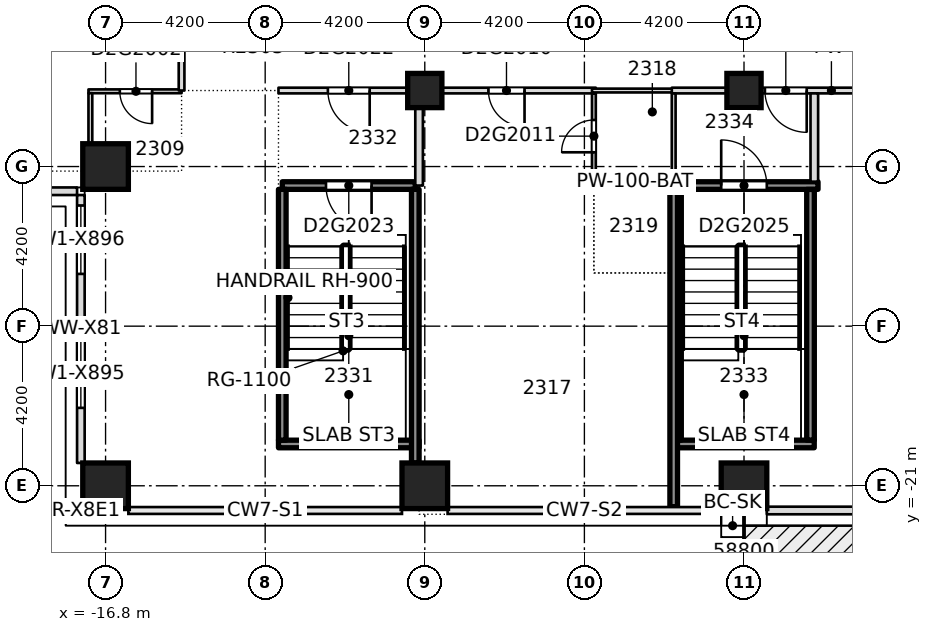
"""IFC4 building model, lengths in metres.
Left out: names, types, materials, properties, quantities, classifications, styles, units other than length and angle.
Written with IfcOpenShell. Run it as: python <this file> out.ifc"""

import sys

from ifc_helpers import new_model, si_unit, direction, frame, frame_2d, origin, origin_2d, place, context, subcontext, project, spatial, rectangle, extrude, element, fill, save


model = new_model("IFC4")
c1 = context("Model", 3, precision=1e-05, world=origin(), true_north=direction((0.0, 1.0)))
c2 = subcontext(c1, "Body", "Model", "MODEL_VIEW")
j1 = project(units=[si_unit("LENGTHUNIT", "METRE"), si_unit("PLANEANGLEUNIT", "RADIAN")], contexts=[c1])
p1 = place(None, origin())
s1 = spatial("IfcSite", under=j1, at=p1, CompositionType="ELEMENT")
p2 = place(p1, origin())
s2 = spatial("IfcBuilding", under=s1, at=p2, CompositionType="ELEMENT")
p3 = place(p2, frame((0.0, 0.0, 94.2)))
s3 = spatial("IfcBuildingStorey", under=s2, at=p3, CompositionType="ELEMENT", Elevation=94.2)
for number, where, z_axis, x_axis in (
    (1, (-16.8, -21.0, -0.32), (0.0, 0.0, 1.0), (1.0, 0.0, 0.0)),
    (2, (-8.4, -21.0, -0.32), (0.0, 0.0, 1.0), (1.0, 0.0, 0.0)),
    (3, (0.0, -21.0, -0.32), (0.0, 0.0, 1.0), (1.0, 0.0, 0.0)),
    (4, (-16.8, -12.6, -0.32), (0.0, 0.0, 1.0), (1.0, 0.0, 0.0)),
):
    element("IfcColumn", number, at=place(p3, frame(where, z_axis=z_axis, x_axis=x_axis)), inside=s3, PredefinedType="COLUMN", context=c2, shape_type="SweptSolid", body=[
        extrude(rectangle(XDim=1.2, YDim=1.2, at=origin_2d()), origin(), (0.0, 0.0, 1.0), 3.45),
    ])
for number, where, z_axis, x_axis in (
    (5, (-8.4, -10.6, -0.32), (0.0, 0.0, 1.0), (1.0, 0.0, 0.0)),
    (6, (0.0, -10.6, -0.32), (0.0, 0.0, 1.0), (1.0, 0.0, 0.0)),
):
    element("IfcColumn", number, at=place(p3, frame(where, z_axis=z_axis, x_axis=x_axis)), inside=s3, PredefinedType="COLUMN", context=c2, shape_type="SweptSolid", body=[
        extrude(rectangle(XDim=0.9, YDim=0.9, at=origin_2d()), origin(), (0.0, 0.0, 1.0), 3.45),
    ])
p4 = place(p3, frame((-1.848, -19.9, 0.0), z_axis=(0.0, 0.0, 1.0), x_axis=(1.0, 0.0, 0.0)))
e7 = element("IfcWall", 7, at=p4, inside=s3, PredefinedType="SOLIDWALL", context=c2, shape_type="SweptSolid", body=[
    extrude(rectangle(XDim=3.696, YDim=0.2, at=frame_2d((1.848, 0.0))), origin(), (0.0, 0.0, 1.0), 3.13),
])
p5 = place(p3, frame((-12.15, -13.1, 0.0), z_axis=(0.0, 0.0, 1.0), x_axis=(1.0, 0.0, 0.0)))
e8 = element("IfcWall", 8, at=p5, inside=s3, PredefinedType="SOLIDWALL", context=c2, shape_type="SweptSolid", body=[
    extrude(rectangle(XDim=3.5, YDim=0.2, at=frame_2d((1.75, 0.0))), origin(), (0.0, 0.0, 1.0), 3.13),
])
p6 = place(p5, frame((1.15, 0.0, 0.0)))
e9 = element("IfcOpeningElement", 9, at=p6, cuts=e8, PredefinedType="OPENING", context=c2, shape_type="SweptSolid", body=[
    extrude(rectangle(XDim=1.2, YDim=2.1, at=frame_2d((0.6, 1.05))), frame((0.0, 0.11, 0.0), z_axis=(0.0, -1.0, 0.0), x_axis=(1.0, 0.0, 0.0)), (0.0, 0.0, 1.0), 0.22),
])
p7 = place(p3, frame((-1.748, -13.1, 0.0), z_axis=(0.0, 0.0, 1.0), x_axis=(1.0, 0.0, 0.0)))
e10 = element("IfcWall", 10, at=p7, inside=s3, PredefinedType="SOLIDWALL", context=c2, shape_type="SweptSolid", body=[
    extrude(rectangle(XDim=3.696, YDim=0.2, at=frame_2d((1.848, 0.0))), origin(), (0.0, 0.0, 1.0), 3.13),
])
p8 = place(p7, frame((1.148, 0.0, 0.0)))
e11 = element("IfcOpeningElement", 11, at=p8, cuts=e10, PredefinedType="OPENING", context=c2, shape_type="SweptSolid", body=[
    extrude(rectangle(XDim=1.2, YDim=2.1, at=frame_2d((0.6, 1.05))), frame((0.0, 0.11, 0.0), z_axis=(0.0, -1.0, 0.0), x_axis=(1.0, 0.0, 0.0)), (0.0, 0.0, 1.0), 0.22),
])
p9 = place(p3, frame((-4.0, -13.0, 0.0), z_axis=(0.0, 0.0, 1.0), x_axis=(1.0, 0.0, 0.0)))
e12 = element("IfcWall", 12, at=p9, inside=s3, PredefinedType="PARTITIONING", context=c2, shape_type="SweptSolid", body=[
    extrude(rectangle(XDim=2.25, YDim=0.1, at=frame_2d((1.125, 0.0))), origin(), (0.0, 0.0, 1.0), 3.13),
])
p10 = place(p3, frame((-17.25, -10.62, 0.0), z_axis=(0.0, 0.0, 1.0), x_axis=(1.0, 0.0, 0.0)))
e13 = element("IfcWall", 13, at=p10, inside=s3, PredefinedType="PARTITIONING", context=c2, shape_type="SweptSolid", body=[
    extrude(rectangle(XDim=2.45, YDim=0.1, at=frame_2d((1.225, 0.0))), origin(), (0.0, 0.0, 1.0), 3.13),
])
p11 = place(p10, frame((0.825, 0.0, 0.0)))
e14 = element("IfcOpeningElement", 14, at=p11, cuts=e13, PredefinedType="OPENING", context=c2, shape_type="SweptSolid", body=[
    extrude(rectangle(XDim=0.85, YDim=2.1, at=frame_2d((0.425, 1.05))), frame((0.0, 0.06, 0.0), z_axis=(0.0, -1.0, 0.0), x_axis=(1.0, 0.0, 0.0)), (0.0, 0.0, 1.0), 0.12),
])
p12 = place(p3, frame((-12.25, -10.6, 0.0), z_axis=(0.0, 0.0, 1.0), x_axis=(1.0, 0.0, 0.0)))
e15 = element("IfcWall", 15, at=p12, inside=s3, PredefinedType="PARTITIONING", context=c2, shape_type="SweptSolid", body=[
    extrude(rectangle(XDim=8.35, YDim=0.15, at=frame_2d((4.175, 0.0))), origin(), (0.0, 0.0, 1.0), 3.13),
])
p13 = place(p12, frame((5.525, 0.0, 0.0)))
e16 = element("IfcOpeningElement", 16, at=p13, cuts=e15, PredefinedType="OPENING", context=c2, shape_type="SweptSolid", body=[
    extrude(rectangle(XDim=0.95, YDim=2.1, at=frame_2d((0.475, 1.05))), frame((0.0, 0.085, 0.0), z_axis=(0.0, -1.0, 0.0), x_axis=(1.0, 0.0, 0.0)), (0.0, 0.0, 1.0), 0.17),
])
p14 = place(p12, frame((1.3, 0.0, 0.0)))
e17 = element("IfcOpeningElement", 17, at=p14, cuts=e15, PredefinedType="OPENING", context=c2, shape_type="SweptSolid", body=[
    extrude(rectangle(XDim=1.1, YDim=2.1, at=frame_2d((0.55, 1.05))), frame((0.0, 0.085, 0.0), z_axis=(0.0, -1.0, 0.0), x_axis=(1.0, 0.0, 0.0)), (0.0, 0.0, 1.0), 0.17),
])
p15 = place(p3, frame((-4.0, -10.6, 0.0), z_axis=(0.0, 0.0, 1.0), x_axis=(1.0, 0.0, 0.0)))
e18 = element("IfcWall", 18, at=p15, inside=s3, PredefinedType="PARTITIONING", context=c2, shape_type="SweptSolid", body=[
    extrude(rectangle(XDim=2.2, YDim=0.1, at=frame_2d((1.1, 0.0))), origin(), (0.0, 0.0, 1.0), 3.13),
])
p16 = place(p3, frame((-1.9, -10.6, 0.0), z_axis=(0.0, 0.0, 1.0), x_axis=(1.0, 0.0, 0.0)))
e19 = element("IfcWall", 19, at=p16, inside=s3, PredefinedType="PARTITIONING", context=c2, shape_type="SweptSolid", body=[
    extrude(rectangle(XDim=8.4, YDim=0.15, at=frame_2d((4.2, 0.0))), origin(), (0.0, 0.0, 1.0), 3.13),
])
p17 = place(p16, frame((5.575, 0.0, 0.0)))
e20 = element("IfcOpeningElement", 20, at=p17, cuts=e19, PredefinedType="OPENING", context=c2, shape_type="SweptSolid", body=[
    extrude(rectangle(XDim=0.95, YDim=2.1, at=frame_2d((0.475, 1.05))), frame((0.0, 0.085, 0.0), z_axis=(0.0, -1.0, 0.0), x_axis=(1.0, 0.0, 0.0)), (0.0, 0.0, 1.0), 0.17),
])
p18 = place(p16, frame((2.45, 0.0, 0.0)))
e21 = element("IfcOpeningElement", 21, at=p18, cuts=e19, PredefinedType="OPENING", context=c2, shape_type="SweptSolid", body=[
    extrude(rectangle(XDim=1.1, YDim=2.1, at=frame_2d((0.55, 1.05))), frame((0.0, 0.085, 0.0), z_axis=(0.0, -1.0, 0.0), x_axis=(1.0, 0.0, 0.0)), (0.0, 0.0, 1.0), 0.17),
])
p19 = place(p3, frame((-17.2, -12.72, 0.0), z_axis=(0.0, 0.0, 1.0), x_axis=(0.0, 1.0, 0.0)))
e22 = element("IfcWall", 22, at=p19, inside=s3, PredefinedType="PARTITIONING", context=c2, shape_type="SweptSolid", body=[
    extrude(rectangle(XDim=2.05, YDim=0.1, at=frame_2d((1.025, 0.0))), origin(), (0.0, 0.0, 1.0), 3.13),
])
p20 = place(p3, frame((-14.8, -10.6, 0.0), z_axis=(0.0, 0.0, 1.0), x_axis=(0.0, 1.0, 0.0)))
e23 = element("IfcWall", 23, at=p20, inside=s3, PredefinedType="PARTITIONING", context=c2, shape_type="SweptSolid", body=[
    extrude(rectangle(XDim=3.125, YDim=0.15, at=frame_2d((1.562, 0.0))), origin(), (0.0, 0.0, 1.0), 3.13),
])
p21 = place(p3, frame((-8.55, -13.1, 0.0), z_axis=(0.0, 0.0, 1.0), x_axis=(0.0, 1.0, 0.0)))
e24 = element("IfcWall", 24, at=p21, inside=s3, PredefinedType="PARTITIONING", context=c2, shape_type="SweptSolid", body=[
    extrude(rectangle(XDim=2.425, YDim=0.2, at=frame_2d((1.212, 0.0))), origin(), (0.0, 0.0, 1.0), 3.13),
])
p22 = place(p3, frame((-3.95, -12.95, 0.0), z_axis=(0.0, 0.0, 1.0), x_axis=(0.0, 1.0, 0.0)))
e25 = element("IfcWall", 25, at=p22, inside=s3, PredefinedType="PARTITIONING", context=c2, shape_type="SweptSolid", body=[
    extrude(rectangle(XDim=2.275, YDim=0.1, at=frame_2d((1.137, 0.0))), origin(), (0.0, 0.0, 1.0), 3.13),
])
p23 = place(p22, frame((0.725, 0.0, 0.0)))
e26 = element("IfcOpeningElement", 26, at=p23, cuts=e25, PredefinedType="OPENING", context=c2, shape_type="SweptSolid", body=[
    extrude(rectangle(XDim=0.85, YDim=2.1, at=frame_2d((0.425, 1.05))), frame((0.0, 0.06, 0.0), z_axis=(0.0, -1.0, 0.0), x_axis=(1.0, 0.0, 0.0)), (0.0, 0.0, 1.0), 0.12),
])
p24 = place(p3, frame((-1.85, -12.95, 0.0), z_axis=(0.0, 0.0, 1.0), x_axis=(0.0, 1.0, 0.0)))
e27 = element("IfcWall", 27, at=p24, inside=s3, PredefinedType="PARTITIONING", context=c2, shape_type="SweptSolid", body=[
    extrude(rectangle(XDim=2.275, YDim=0.1, at=frame_2d((1.137, 0.0))), origin(), (0.0, 0.0, 1.0), 3.13),
])
for number, where, z_axis, x_axis in (
    (28, (-1.75, -19.798, 0.0), (0.0, 0.0, 1.0), (0.0, 1.0, 0.0)),
    (29, (1.75, -19.798, 0.0), (0.0, 0.0, 1.0), (0.0, 1.0, 0.0)),
):
    element("IfcWall", number, at=place(p3, frame(where, z_axis=z_axis, x_axis=x_axis)), inside=s3, PredefinedType="SOLIDWALL", context=c2, shape_type="SweptSolid", body=[
        extrude(rectangle(XDim=6.596, YDim=0.2, at=frame_2d((3.298, 0.0))), origin(), (0.0, 0.0, 1.0), 3.13),
    ])
p25 = place(p3, frame((1.85, -12.998, 0.0), z_axis=(0.0, 0.0, 1.0), x_axis=(0.0, 1.0, 0.0)))
e30 = element("IfcWall", 30, at=p25, inside=s3, PredefinedType="PARTITIONING", context=c2, shape_type="SweptSolid", body=[
    extrude(rectangle(XDim=2.323, YDim=0.2, at=frame_2d((1.162, 0.0))), origin(), (0.0, 0.0, 1.0), 3.13),
])
p26 = place(p3, frame((0.6, -21.65, 0.0), z_axis=(0.0, 0.0, 1.0), x_axis=(1.0, 0.0, 0.0)))
e31 = element("IfcWall", 31, at=p26, inside=s3, PredefinedType="STANDARD", context=c2, shape_type="SweptSolid", body=[
    extrude(rectangle(XDim=7.2, YDim=0.2, at=frame_2d((3.6, 0.0))), origin(), (0.0, 0.0, 1.0), 3.13),
])
p27 = place(p26, frame((3.95, 0.0, 0.2)))
e32 = element("IfcOpeningElement", 32, at=p27, cuts=e31, PredefinedType="OPENING", context=c2, shape_type="SweptSolid", body=[
    extrude(rectangle(XDim=1.8, YDim=2.65, at=frame_2d((0.9, 1.325))), frame((0.0, 0.11, 0.0), z_axis=(0.0, -1.0, 0.0), x_axis=(1.0, 0.0, 0.0)), (0.0, 0.0, 1.0), 0.22),
])
p28 = place(p26, frame((5.85, 0.0, 0.0)))
e33 = element("IfcOpeningElement", 33, at=p28, cuts=e31, PredefinedType="OPENING", context=c2, shape_type="SweptSolid", body=[
    extrude(rectangle(XDim=1.0, YDim=2.4, at=frame_2d((0.5, 1.2))), frame((0.0, 0.11, 0.0), z_axis=(0.0, -1.0, 0.0), x_axis=(1.0, 0.0, 0.0)), (0.0, 0.0, 1.0), 0.22),
])
p29 = place(p3, frame((-24.6, -13.25, 0.0), z_axis=(0.0, 0.0, 1.0), x_axis=(1.0, 0.0, 0.0)))
e34 = element("IfcWall", 34, at=p29, inside=s3, PredefinedType="STANDARD", context=c2, shape_type="SweptSolid", body=[
    extrude(rectangle(XDim=7.05, YDim=0.2, at=frame_2d((3.525, 0.0))), origin(), (0.0, 0.0, 1.0), 3.13),
])
p30 = place(p3, frame((-17.45, -13.35, 0.0), z_axis=(0.0, 0.0, 1.0), x_axis=(0.0, -1.0, 0.0)))
e35 = element("IfcWall", 35, at=p30, inside=s3, PredefinedType="STANDARD", context=c2, shape_type="SweptSolid", body=[
    extrude(rectangle(XDim=7.05, YDim=0.2, at=frame_2d((3.525, 0.0))), origin(), (0.0, 0.0, 1.0), 3.13),
])
p31 = place(p30, frame((3.8, 0.0, 0.2)))
e36 = element("IfcOpeningElement", 36, at=p31, cuts=e35, PredefinedType="OPENING", context=c2, shape_type="SweptSolid", body=[
    extrude(rectangle(XDim=1.8, YDim=2.65, at=frame_2d((0.9, 1.325))), frame((0.0, 0.11, 0.0), z_axis=(0.0, -1.0, 0.0), x_axis=(1.0, 0.0, 0.0)), (0.0, 0.0, 1.0), 0.22),
])
p32 = place(p30, frame((0.275, 0.0, 0.2)))
e37 = element("IfcOpeningElement", 37, at=p32, cuts=e35, PredefinedType="OPENING", context=c2, shape_type="SweptSolid", body=[
    extrude(rectangle(XDim=1.8, YDim=2.65, at=frame_2d((0.9, 1.325))), frame((0.0, 0.11, 0.0), z_axis=(0.0, -1.0, 0.0), x_axis=(1.0, 0.0, 0.0)), (0.0, 0.0, 1.0), 0.22),
])
p33 = place(p3, frame((-12.25, -19.9, 0.0), z_axis=(0.0, 0.0, 1.0), x_axis=(1.0, 0.0, 0.0)))
e38 = element("IfcWall", 38, at=p33, inside=s3, PredefinedType="SOLIDWALL", context=c2, shape_type="SweptSolid", body=[
    extrude(rectangle(XDim=3.7, YDim=0.2, at=frame_2d((1.85, 0.0))), origin(), (0.0, 0.0, 1.0), 3.13),
])
p34 = place(p3, frame((-12.15, -19.8, 0.0), z_axis=(0.0, 0.0, 1.0), x_axis=(0.0, 1.0, 0.0)))
e39 = element("IfcWall", 39, at=p34, inside=s3, PredefinedType="SOLIDWALL", context=c2, shape_type="SweptSolid", body=[
    extrude(rectangle(XDim=6.6, YDim=0.2, at=frame_2d((3.3, 0.0))), origin(), (0.0, 0.0, 1.0), 3.13),
])
p35 = place(p3, frame((-8.65, -20.4, 0.0), z_axis=(0.0, 0.0, 1.0), x_axis=(0.0, 1.0, 0.0)))
e40 = element("IfcWall", 40, at=p35, inside=s3, PredefinedType="SOLIDWALL", context=c2, shape_type="SweptSolid", body=[
    extrude(rectangle(XDim=7.2, YDim=0.2, at=frame_2d((3.6, 0.0))), origin(), (0.0, 0.0, 1.0), 3.13),
])
p36 = place(p3, frame((-1.85, -21.55, 0.0), z_axis=(0.0, 0.0, 1.0), x_axis=(0.0, 1.0, 0.0)))
e41 = element("IfcWall", 41, at=p36, inside=s3, PredefinedType="SOLIDWALL", context=c2, shape_type="SweptSolid", body=[
    extrude(rectangle(XDim=8.5, YDim=0.2, at=frame_2d((4.25, 0.0))), origin(), (0.0, 0.0, 1.0), 3.13),
])
p37 = place(p11, origin())
e42 = element("IfcDoor", 42, at=p37, inside=s3, OperationType="SINGLE_SWING_RIGHT", PredefinedType="DOOR", context=c2, shape_type="SweptSolid", body=[
    extrude(rectangle(XDim=0.85, YDim=2.1, at=frame_2d((0.425, 1.05))), frame((0.0, 0.025, 0.0), z_axis=(0.0, -1.0, 0.0), x_axis=(1.0, 0.0, 0.0)), (0.0, 0.0, 1.0), 0.05),
])
fill(e14, e42)
p38 = place(p13, origin())
e43 = element("IfcDoor", 43, at=p38, inside=s3, OperationType="SINGLE_SWING_LEFT", PredefinedType="DOOR", context=c2, shape_type="SweptSolid", body=[
    extrude(rectangle(XDim=0.95, YDim=2.1, at=frame_2d((0.475, 1.05))), frame((0.0, 0.025, 0.0), z_axis=(0.0, -1.0, 0.0), x_axis=(1.0, 0.0, 0.0)), (0.0, 0.0, 1.0), 0.05),
])
fill(e16, e43)
p39 = place(p23, origin())
e44 = element("IfcDoor", 44, at=p39, inside=s3, OperationType="SINGLE_SWING_RIGHT", PredefinedType="DOOR", context=c2, shape_type="SweptSolid", body=[
    extrude(rectangle(XDim=0.85, YDim=2.1, at=frame_2d((0.425, 1.05))), frame((0.0, 0.025, 0.0), z_axis=(0.0, -1.0, 0.0), x_axis=(1.0, 0.0, 0.0)), (0.0, 0.0, 1.0), 0.05),
])
fill(e26, e44)
p40 = place(p14, origin())
e45 = element("IfcDoor", 45, at=p40, inside=s3, OperationType="SINGLE_SWING_RIGHT", PredefinedType="DOOR", context=c2, shape_type="SweptSolid", body=[
    extrude(rectangle(XDim=1.1, YDim=2.1, at=frame_2d((0.55, 1.05))), frame((0.0, 0.025, 0.0), z_axis=(0.0, -1.0, 0.0), x_axis=(1.0, 0.0, 0.0)), (0.0, 0.0, 1.0), 0.05),
])
fill(e17, e45)
p41 = place(p6, origin())
e46 = element("IfcDoor", 46, at=p41, inside=s3, OperationType="SINGLE_SWING_RIGHT", PredefinedType="DOOR", context=c2, shape_type="SweptSolid", body=[
    extrude(rectangle(XDim=1.2, YDim=2.1, at=frame_2d((0.6, 1.05))), frame((0.0, 0.025, 0.0), z_axis=(0.0, -1.0, 0.0), x_axis=(1.0, 0.0, 0.0)), (0.0, 0.0, 1.0), 0.05),
])
fill(e9, e46)
p42 = place(p18, origin())
e47 = element("IfcDoor", 47, at=p42, inside=s3, OperationType="SINGLE_SWING_LEFT", PredefinedType="DOOR", context=c2, shape_type="SweptSolid", body=[
    extrude(rectangle(XDim=1.1, YDim=2.1, at=frame_2d((0.55, 1.05))), frame((0.0, 0.025, 0.0), z_axis=(0.0, -1.0, 0.0), x_axis=(1.0, 0.0, 0.0)), (0.0, 0.0, 1.0), 0.05),
])
fill(e21, e47)
p43 = place(p8, origin())
e48 = element("IfcDoor", 48, at=p43, inside=s3, OperationType="SINGLE_SWING_RIGHT", PredefinedType="DOOR", context=c2, shape_type="SweptSolid", body=[
    extrude(rectangle(XDim=1.2, YDim=2.1, at=frame_2d((0.6, 1.05))), frame((0.0, 0.025, 0.0), z_axis=(0.0, -1.0, 0.0), x_axis=(1.0, 0.0, 0.0)), (0.0, 0.0, 1.0), 0.05),
])
fill(e11, e48)
p44 = place(p31, origin())
e49 = element("IfcWindow", 49, at=p44, inside=s3, PartitioningType="SINGLE_PANEL", PredefinedType="WINDOW", context=c2, shape_type="SweptSolid", body=[
    extrude(rectangle(XDim=1.8, YDim=2.65, at=frame_2d((0.9, 1.325))), frame((0.0, 0.03, 0.0), z_axis=(0.0, -1.0, 0.0), x_axis=(1.0, 0.0, 0.0)), (0.0, 0.0, 1.0), 0.06),
])
fill(e36, e49)
p45 = place(p32, origin())
e50 = element("IfcWindow", 50, at=p45, inside=s3, PartitioningType="SINGLE_PANEL", PredefinedType="WINDOW", context=c2, shape_type="SweptSolid", body=[
    extrude(rectangle(XDim=1.8, YDim=2.65, at=frame_2d((0.9, 1.325))), frame((0.0, 0.03, 0.0), z_axis=(0.0, -1.0, 0.0), x_axis=(1.0, 0.0, 0.0)), (0.0, 0.0, 1.0), 0.06),
])
fill(e37, e50)
save(model, sys.argv[1])
